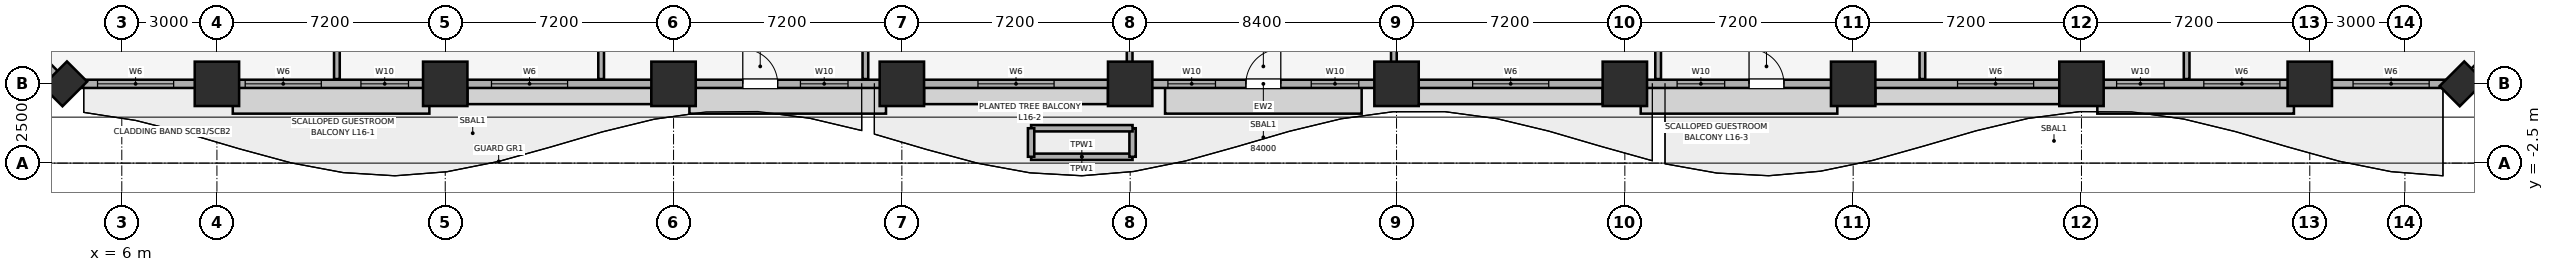
"""IFC4 building model, lengths in metres.
Left out: names, types, materials, properties, quantities, classifications, styles, units other than length and angle.
Written with IfcOpenShell. Run it as: python <this file> out.ifc"""

import sys

from ifc_helpers import new_model, si_unit, direction, frame, frame_2d, origin, origin_2d, place, context, subcontext, project, spatial, rectangle, extrude, element, fill, save


model = new_model("IFC4")
c1 = context("Model", 3, precision=1e-05, world=origin(), true_north=direction((0.0, 1.0)))
c2 = subcontext(c1, "Body", "Model", "MODEL_VIEW")
j1 = project(units=[si_unit("LENGTHUNIT", "METRE"), si_unit("PLANEANGLEUNIT", "RADIAN")], contexts=[c1])
p1 = place(None, origin())
s1 = spatial("IfcSite", under=j1, at=p1, CompositionType="ELEMENT")
p2 = place(p1, origin())
s2 = spatial("IfcBuilding", under=s1, at=p2, CompositionType="ELEMENT")
p3 = place(p2, frame((0.0, 0.0, 72.65)))
s3 = spatial("IfcBuildingStorey", under=s2, at=p3, CompositionType="ELEMENT", Elevation=72.65)
for number, where, z_axis, x_axis in (
    (1, (9.0, 0.0, 0.0), (0.0, 0.0, 1.0), (1.0, 0.0, 0.0)),
    (2, (16.2, 0.0, 0.0), (0.0, 0.0, 1.0), (1.0, 0.0, 0.0)),
    (3, (23.4, 0.0, 0.0), (0.0, 0.0, 1.0), (1.0, 0.0, 0.0)),
    (4, (30.6, 0.0, 0.0), (0.0, 0.0, 1.0), (1.0, 0.0, 0.0)),
    (5, (37.8, 0.0, 0.0), (0.0, 0.0, 1.0), (1.0, 0.0, 0.0)),
    (6, (46.2, 0.0, 0.0), (0.0, 0.0, 1.0), (1.0, 0.0, 0.0)),
    (7, (53.4, 0.0, 0.0), (0.0, 0.0, 1.0), (1.0, 0.0, 0.0)),
    (8, (60.6, 0.0, 0.0), (0.0, 0.0, 1.0), (1.0, 0.0, 0.0)),
    (9, (67.8, 0.0, 0.0), (0.0, 0.0, 1.0), (1.0, 0.0, 0.0)),
    (10, (75.0, 0.0, 0.0), (0.0, 0.0, 1.0), (1.0, 0.0, 0.0)),
):
    element("IfcColumn", number, at=place(p3, frame(where, z_axis=z_axis, x_axis=x_axis)), inside=s3, PredefinedType="COLUMN", context=c2, shape_type="SweptSolid", body=[
        extrude(rectangle(XDim=1.4, YDim=1.4, at=origin_2d()), origin(), (0.0, 0.0, 1.0), 3.51),
    ])
for number, where, z_axis, x_axis in (
    (11, (4.2, 0.0, 0.0), (0.0, 0.0, 1.0), (0.707, 0.707, 0.0)),
    (12, (79.8, 0.0, 0.0), (0.0, 0.0, 1.0), (0.707, 0.707, 0.0)),
):
    element("IfcColumn", number, at=place(p3, frame(where, z_axis=z_axis, x_axis=x_axis)), inside=s3, PredefinedType="PILASTER", context=c2, shape_type="SweptSolid", body=[
        extrude(rectangle(XDim=1.1, YDim=0.9, at=origin_2d()), origin(), (0.0, 0.0, 1.0), 3.51),
    ])
p4 = place(p3, frame((4.2, 0.0, 0.0), z_axis=(0.0, 0.0, 1.0), x_axis=(1.0, 0.0, 0.0)))
e13 = element("IfcWall", 13, at=p4, inside=s3, PredefinedType="SOLIDWALL", context=c2, shape_type="SweptSolid", body=[
    extrude(rectangle(XDim=75.6, YDim=0.26, at=frame_2d((37.8, 0.0))), origin(), (0.0, 0.0, 1.0), 2.56),
])
p5 = place(p4, frame((21.383, 0.0, 0.0)))
e14 = element("IfcOpeningElement", 14, at=p5, cuts=e13, PredefinedType="OPENING", context=c2, shape_type="SweptSolid", body=[
    extrude(rectangle(XDim=1.1, YDim=2.15, at=frame_2d((0.55, 1.075))), frame((0.0, 0.14, 0.0), z_axis=(0.0, -1.0, 0.0), x_axis=(1.0, 0.0, 0.0)), (0.0, 0.0, 1.0), 0.28),
])
p6 = place(p4, frame((37.25, 0.0, 0.0)))
e15 = element("IfcOpeningElement", 15, at=p6, cuts=e13, PredefinedType="OPENING", context=c2, shape_type="SweptSolid", body=[
    extrude(rectangle(XDim=1.1, YDim=2.15, at=frame_2d((0.55, 1.075))), frame((0.0, 0.14, 0.0), z_axis=(0.0, -1.0, 0.0), x_axis=(1.0, 0.0, 0.0)), (0.0, 0.0, 1.0), 0.28),
])
p7 = place(p4, frame((53.117, 0.0, 0.0)))
e16 = element("IfcOpeningElement", 16, at=p7, cuts=e13, PredefinedType="OPENING", context=c2, shape_type="SweptSolid", body=[
    extrude(rectangle(XDim=1.1, YDim=2.15, at=frame_2d((0.55, 1.075))), frame((0.0, 0.14, 0.0), z_axis=(0.0, -1.0, 0.0), x_axis=(1.0, 0.0, 0.0)), (0.0, 0.0, 1.0), 0.28),
])
p8 = place(p4, frame((1.035, 0.0, 0.85)))
e17 = element("IfcOpeningElement", 17, at=p8, cuts=e13, PredefinedType="OPENING", context=c2, shape_type="SweptSolid", body=[
    extrude(rectangle(XDim=2.4, YDim=1.5, at=frame_2d((1.2, 0.75))), frame((0.0, 0.14, 0.0), z_axis=(0.0, -1.0, 0.0), x_axis=(1.0, 0.0, 0.0)), (0.0, 0.0, 1.0), 0.28),
])
p9 = place(p4, frame((5.691, 0.0, 0.85)))
e18 = element("IfcOpeningElement", 18, at=p9, cuts=e13, PredefinedType="OPENING", context=c2, shape_type="SweptSolid", body=[
    extrude(rectangle(XDim=2.4, YDim=1.5, at=frame_2d((1.2, 0.75))), frame((0.0, 0.14, 0.0), z_axis=(0.0, -1.0, 0.0), x_axis=(1.0, 0.0, 0.0)), (0.0, 0.0, 1.0), 0.28),
])
p10 = place(p4, frame((9.342, 0.0, 0.85)))
e19 = element("IfcOpeningElement", 19, at=p10, cuts=e13, PredefinedType="OPENING", context=c2, shape_type="SweptSolid", body=[
    extrude(rectangle(XDim=1.5, YDim=1.4, at=frame_2d((0.75, 0.7))), frame((0.0, 0.14, 0.0), z_axis=(0.0, -1.0, 0.0), x_axis=(1.0, 0.0, 0.0)), (0.0, 0.0, 1.0), 0.28),
])
p11 = place(p4, frame((13.458, 0.0, 0.85)))
e20 = element("IfcOpeningElement", 20, at=p11, cuts=e13, PredefinedType="OPENING", context=c2, shape_type="SweptSolid", body=[
    extrude(rectangle(XDim=2.4, YDim=1.5, at=frame_2d((1.2, 0.75))), frame((0.0, 0.14, 0.0), z_axis=(0.0, -1.0, 0.0), x_axis=(1.0, 0.0, 0.0)), (0.0, 0.0, 1.0), 0.28),
])
p12 = place(p4, frame((23.202, 0.0, 0.85)))
e21 = element("IfcOpeningElement", 21, at=p12, cuts=e13, PredefinedType="OPENING", context=c2, shape_type="SweptSolid", body=[
    extrude(rectangle(XDim=1.5, YDim=1.4, at=frame_2d((0.75, 0.7))), frame((0.0, 0.14, 0.0), z_axis=(0.0, -1.0, 0.0), x_axis=(1.0, 0.0, 0.0)), (0.0, 0.0, 1.0), 0.28),
])
p13 = place(p4, frame((28.8, 0.0, 0.85)))
e22 = element("IfcOpeningElement", 22, at=p13, cuts=e13, PredefinedType="OPENING", context=c2, shape_type="SweptSolid", body=[
    extrude(rectangle(XDim=2.4, YDim=1.5, at=frame_2d((1.2, 0.75))), frame((0.0, 0.14, 0.0), z_axis=(0.0, -1.0, 0.0), x_axis=(1.0, 0.0, 0.0)), (0.0, 0.0, 1.0), 0.28),
])
p14 = place(p4, frame((34.79, 0.0, 0.85)))
e23 = element("IfcOpeningElement", 23, at=p14, cuts=e13, PredefinedType="OPENING", context=c2, shape_type="SweptSolid", body=[
    extrude(rectangle(XDim=1.5, YDim=1.4, at=frame_2d((0.75, 0.7))), frame((0.0, 0.14, 0.0), z_axis=(0.0, -1.0, 0.0), x_axis=(1.0, 0.0, 0.0)), (0.0, 0.0, 1.0), 0.28),
])
p15 = place(p4, frame((39.31, 0.0, 0.85)))
e24 = element("IfcOpeningElement", 24, at=p15, cuts=e13, PredefinedType="OPENING", context=c2, shape_type="SweptSolid", body=[
    extrude(rectangle(XDim=1.5, YDim=1.4, at=frame_2d((0.75, 0.7))), frame((0.0, 0.14, 0.0), z_axis=(0.0, -1.0, 0.0), x_axis=(1.0, 0.0, 0.0)), (0.0, 0.0, 1.0), 0.28),
])
p16 = place(p4, frame((44.4, 0.0, 0.85)))
e25 = element("IfcOpeningElement", 25, at=p16, cuts=e13, PredefinedType="OPENING", context=c2, shape_type="SweptSolid", body=[
    extrude(rectangle(XDim=2.4, YDim=1.5, at=frame_2d((1.2, 0.75))), frame((0.0, 0.14, 0.0), z_axis=(0.0, -1.0, 0.0), x_axis=(1.0, 0.0, 0.0)), (0.0, 0.0, 1.0), 0.28),
])
p17 = place(p4, frame((50.848, 0.0, 0.85)))
e26 = element("IfcOpeningElement", 26, at=p17, cuts=e13, PredefinedType="OPENING", context=c2, shape_type="SweptSolid", body=[
    extrude(rectangle(XDim=1.5, YDim=1.4, at=frame_2d((0.75, 0.7))), frame((0.0, 0.14, 0.0), z_axis=(0.0, -1.0, 0.0), x_axis=(1.0, 0.0, 0.0)), (0.0, 0.0, 1.0), 0.28),
])
p18 = place(p4, frame((59.691, 0.0, 0.85)))
e27 = element("IfcOpeningElement", 27, at=p18, cuts=e13, PredefinedType="OPENING", context=c2, shape_type="SweptSolid", body=[
    extrude(rectangle(XDim=2.4, YDim=1.5, at=frame_2d((1.2, 0.75))), frame((0.0, 0.14, 0.0), z_axis=(0.0, -1.0, 0.0), x_axis=(1.0, 0.0, 0.0)), (0.0, 0.0, 1.0), 0.28),
])
p19 = place(p4, frame((64.708, 0.0, 0.85)))
e28 = element("IfcOpeningElement", 28, at=p19, cuts=e13, PredefinedType="OPENING", context=c2, shape_type="SweptSolid", body=[
    extrude(rectangle(XDim=1.5, YDim=1.4, at=frame_2d((0.75, 0.7))), frame((0.0, 0.14, 0.0), z_axis=(0.0, -1.0, 0.0), x_axis=(1.0, 0.0, 0.0)), (0.0, 0.0, 1.0), 0.28),
])
p20 = place(p4, frame((67.458, 0.0, 0.85)))
e29 = element("IfcOpeningElement", 29, at=p20, cuts=e13, PredefinedType="OPENING", context=c2, shape_type="SweptSolid", body=[
    extrude(rectangle(XDim=2.4, YDim=1.5, at=frame_2d((1.2, 0.75))), frame((0.0, 0.14, 0.0), z_axis=(0.0, -1.0, 0.0), x_axis=(1.0, 0.0, 0.0)), (0.0, 0.0, 1.0), 0.28),
])
p21 = place(p4, frame((72.165, 0.0, 0.85)))
e30 = element("IfcOpeningElement", 30, at=p21, cuts=e13, PredefinedType="OPENING", context=c2, shape_type="SweptSolid", body=[
    extrude(rectangle(XDim=2.4, YDim=1.5, at=frame_2d((1.2, 0.75))), frame((0.0, 0.14, 0.0), z_axis=(0.0, -1.0, 0.0), x_axis=(1.0, 0.0, 0.0)), (0.0, 0.0, 1.0), 0.28),
])
for number, where, z_axis, x_axis in (
    (31, (79.8, 0.0, 0.0), (0.0, 0.0, 1.0), (0.707, 0.707, 0.0)),
    (32, (0.0, 4.2, 0.0), (0.0, 0.0, 1.0), (0.707, -0.707, 0.0)),
):
    element("IfcWall", number, at=place(p3, frame(where, z_axis=z_axis, x_axis=x_axis)), inside=s3, PredefinedType="SOLIDWALL", context=c2, shape_type="SweptSolid", body=[
        extrude(rectangle(XDim=5.94, YDim=0.26, at=frame_2d((2.97, 0.0))), origin(), (0.0, 0.0, 1.0), 2.56),
    ])
p22 = place(p3, frame((34.676, -2.3, 0.0), z_axis=(0.0, 0.0, 1.0), x_axis=(1.0, 0.0, 0.0)))
e33 = element("IfcWall", 33, at=p22, inside=s3, PredefinedType="PARAPET", context=c2, shape_type="SweptSolid", body=[
    extrude(rectangle(XDim=3.2, YDim=0.2, at=frame_2d((1.6, 0.0))), origin(), (0.0, 0.0, 1.0), 0.55),
])
p23 = place(p3, frame((37.875, -2.3, 0.0), z_axis=(0.0, 0.0, 1.0), x_axis=(0.0, 1.0, 0.0)))
e34 = element("IfcWall", 34, at=p23, inside=s3, PredefinedType="PARAPET", context=c2, shape_type="SweptSolid", body=[
    extrude(rectangle(XDim=0.9, YDim=0.2, at=frame_2d((0.45, 0.0))), origin(), (0.0, 0.0, 1.0), 0.55),
])
p24 = place(p3, frame((37.875, -1.4, 0.0), z_axis=(0.0, 0.0, 1.0), x_axis=(-1.0, 0.0, 0.0)))
e35 = element("IfcWall", 35, at=p24, inside=s3, PredefinedType="PARAPET", context=c2, shape_type="SweptSolid", body=[
    extrude(rectangle(XDim=3.2, YDim=0.2, at=frame_2d((1.6, 0.0))), origin(), (0.0, 0.0, 1.0), 0.55),
])
p25 = place(p3, frame((34.676, -1.4, 0.0), z_axis=(0.0, 0.0, 1.0), x_axis=(0.0, -1.0, 0.0)))
e36 = element("IfcWall", 36, at=p25, inside=s3, PredefinedType="PARAPET", context=c2, shape_type="SweptSolid", body=[
    extrude(rectangle(XDim=0.9, YDim=0.2, at=frame_2d((0.45, 0.0))), origin(), (0.0, 0.0, 1.0), 0.55),
])
p26 = place(p3, frame((12.783, 0.15, 0.0), z_axis=(0.0, 0.0, 1.0), x_axis=(0.0, 1.0, 0.0)))
e37 = element("IfcWall", 37, at=p26, inside=s3, PredefinedType="PARTITIONING", context=c2, shape_type="SweptSolid", body=[
    extrude(rectangle(XDim=18.955, YDim=0.18, at=frame_2d((9.478, 0.0))), origin(), (0.0, 0.0, 1.0), 2.898),
])
for number, where, z_axis, x_axis in (
    (38, (21.117, 0.15, 0.0), (0.0, 0.0, 1.0), (0.0, 1.0, 0.0)),
    (39, (29.45, 0.15, 0.0), (0.0, 0.0, 1.0), (0.0, 1.0, 0.0)),
):
    element("IfcWall", number, at=place(p3, frame(where, z_axis=z_axis, x_axis=x_axis)), inside=s3, PredefinedType="PARTITIONING", context=c2, shape_type="SweptSolid", body=[
        extrude(rectangle(XDim=18.955, YDim=0.18, at=frame_2d((9.478, 0.0))), origin(), (0.0, 0.0, 1.0), 3.51),
    ])
for number, where, z_axis, x_axis in (
    (40, (37.783, 0.15, 0.0), (0.0, 0.0, 1.0), (0.0, 1.0, 0.0)),
    (41, (46.116, 0.15, 0.0), (0.0, 0.0, 1.0), (0.0, 1.0, 0.0)),
):
    element("IfcWall", number, at=place(p3, frame(where, z_axis=z_axis, x_axis=x_axis)), inside=s3, PredefinedType="PARTITIONING", context=c2, shape_type="SweptSolid", body=[
        extrude(rectangle(XDim=18.955, YDim=0.18, at=frame_2d((9.478, 0.0))), origin(), (0.0, 0.0, 1.0), 2.898),
    ])
for number, where, z_axis, x_axis in (
    (42, (54.45, 0.15, 0.0), (0.0, 0.0, 1.0), (0.0, 1.0, 0.0)),
    (43, (62.783, 0.15, 0.0), (0.0, 0.0, 1.0), (0.0, 1.0, 0.0)),
):
    element("IfcWall", number, at=place(p3, frame(where, z_axis=z_axis, x_axis=x_axis)), inside=s3, PredefinedType="PARTITIONING", context=c2, shape_type="SweptSolid", body=[
        extrude(rectangle(XDim=18.955, YDim=0.18, at=frame_2d((9.478, 0.0))), origin(), (0.0, 0.0, 1.0), 3.51),
    ])
p27 = place(p3, frame((71.116, 0.15, 0.0), z_axis=(0.0, 0.0, 1.0), x_axis=(0.0, 1.0, 0.0)))
e44 = element("IfcWall", 44, at=p27, inside=s3, PredefinedType="PARTITIONING", context=c2, shape_type="SweptSolid", body=[
    extrude(rectangle(XDim=18.955, YDim=0.18, at=frame_2d((9.478, 0.0))), origin(), (0.0, 0.0, 1.0), 2.898),
])
p28 = place(p5, origin())
e45 = element("IfcDoor", 45, at=p28, inside=s3, OperationType="SINGLE_SWING_LEFT", PredefinedType="DOOR", context=c2, shape_type="SweptSolid", body=[
    extrude(rectangle(XDim=1.1, YDim=2.15, at=frame_2d((0.55, 1.075))), frame((0.0, 0.025, 0.0), z_axis=(0.0, -1.0, 0.0), x_axis=(1.0, 0.0, 0.0)), (0.0, 0.0, 1.0), 0.05),
])
fill(e14, e45)
p29 = place(p6, origin())
e46 = element("IfcDoor", 46, at=p29, inside=s3, OperationType="SINGLE_SWING_RIGHT", PredefinedType="DOOR", context=c2, shape_type="SweptSolid", body=[
    extrude(rectangle(XDim=1.1, YDim=2.15, at=frame_2d((0.55, 1.075))), frame((0.0, 0.025, 0.0), z_axis=(0.0, -1.0, 0.0), x_axis=(1.0, 0.0, 0.0)), (0.0, 0.0, 1.0), 0.05),
])
fill(e15, e46)
p30 = place(p7, origin())
e47 = element("IfcDoor", 47, at=p30, inside=s3, OperationType="SINGLE_SWING_LEFT", PredefinedType="DOOR", context=c2, shape_type="SweptSolid", body=[
    extrude(rectangle(XDim=1.1, YDim=2.15, at=frame_2d((0.55, 1.075))), frame((0.0, 0.025, 0.0), z_axis=(0.0, -1.0, 0.0), x_axis=(1.0, 0.0, 0.0)), (0.0, 0.0, 1.0), 0.05),
])
fill(e16, e47)
p31 = place(p8, origin())
e48 = element("IfcWindow", 48, at=p31, inside=s3, PartitioningType="SINGLE_PANEL", PredefinedType="WINDOW", context=c2, shape_type="SweptSolid", body=[
    extrude(rectangle(XDim=2.4, YDim=1.5, at=frame_2d((1.2, 0.75))), frame((0.0, 0.03, 0.0), z_axis=(0.0, -1.0, 0.0), x_axis=(1.0, 0.0, 0.0)), (0.0, 0.0, 1.0), 0.06),
])
fill(e17, e48)
p32 = place(p9, origin())
e49 = element("IfcWindow", 49, at=p32, inside=s3, PartitioningType="SINGLE_PANEL", PredefinedType="WINDOW", context=c2, shape_type="SweptSolid", body=[
    extrude(rectangle(XDim=2.4, YDim=1.5, at=frame_2d((1.2, 0.75))), frame((0.0, 0.03, 0.0), z_axis=(0.0, -1.0, 0.0), x_axis=(1.0, 0.0, 0.0)), (0.0, 0.0, 1.0), 0.06),
])
fill(e18, e49)
p33 = place(p10, origin())
e50 = element("IfcWindow", 50, at=p33, inside=s3, PartitioningType="SINGLE_PANEL", PredefinedType="WINDOW", context=c2, shape_type="SweptSolid", body=[
    extrude(rectangle(XDim=1.5, YDim=1.4, at=frame_2d((0.75, 0.7))), frame((0.0, 0.03, 0.0), z_axis=(0.0, -1.0, 0.0), x_axis=(1.0, 0.0, 0.0)), (0.0, 0.0, 1.0), 0.06),
])
fill(e19, e50)
p34 = place(p11, origin())
e51 = element("IfcWindow", 51, at=p34, inside=s3, PartitioningType="SINGLE_PANEL", PredefinedType="WINDOW", context=c2, shape_type="SweptSolid", body=[
    extrude(rectangle(XDim=2.4, YDim=1.5, at=frame_2d((1.2, 0.75))), frame((0.0, 0.03, 0.0), z_axis=(0.0, -1.0, 0.0), x_axis=(1.0, 0.0, 0.0)), (0.0, 0.0, 1.0), 0.06),
])
fill(e20, e51)
p35 = place(p12, origin())
e52 = element("IfcWindow", 52, at=p35, inside=s3, PartitioningType="SINGLE_PANEL", PredefinedType="WINDOW", context=c2, shape_type="SweptSolid", body=[
    extrude(rectangle(XDim=1.5, YDim=1.4, at=frame_2d((0.75, 0.7))), frame((0.0, 0.03, 0.0), z_axis=(0.0, -1.0, 0.0), x_axis=(1.0, 0.0, 0.0)), (0.0, 0.0, 1.0), 0.06),
])
fill(e21, e52)
p36 = place(p13, origin())
e53 = element("IfcWindow", 53, at=p36, inside=s3, PartitioningType="SINGLE_PANEL", PredefinedType="WINDOW", context=c2, shape_type="SweptSolid", body=[
    extrude(rectangle(XDim=2.4, YDim=1.5, at=frame_2d((1.2, 0.75))), frame((0.0, 0.03, 0.0), z_axis=(0.0, -1.0, 0.0), x_axis=(1.0, 0.0, 0.0)), (0.0, 0.0, 1.0), 0.06),
])
fill(e22, e53)
p37 = place(p14, origin())
e54 = element("IfcWindow", 54, at=p37, inside=s3, PartitioningType="SINGLE_PANEL", PredefinedType="WINDOW", context=c2, shape_type="SweptSolid", body=[
    extrude(rectangle(XDim=1.5, YDim=1.4, at=frame_2d((0.75, 0.7))), frame((0.0, 0.03, 0.0), z_axis=(0.0, -1.0, 0.0), x_axis=(1.0, 0.0, 0.0)), (0.0, 0.0, 1.0), 0.06),
])
fill(e23, e54)
p38 = place(p15, origin())
e55 = element("IfcWindow", 55, at=p38, inside=s3, PartitioningType="SINGLE_PANEL", PredefinedType="WINDOW", context=c2, shape_type="SweptSolid", body=[
    extrude(rectangle(XDim=1.5, YDim=1.4, at=frame_2d((0.75, 0.7))), frame((0.0, 0.03, 0.0), z_axis=(0.0, -1.0, 0.0), x_axis=(1.0, 0.0, 0.0)), (0.0, 0.0, 1.0), 0.06),
])
fill(e24, e55)
p39 = place(p16, origin())
e56 = element("IfcWindow", 56, at=p39, inside=s3, PartitioningType="SINGLE_PANEL", PredefinedType="WINDOW", context=c2, shape_type="SweptSolid", body=[
    extrude(rectangle(XDim=2.4, YDim=1.5, at=frame_2d((1.2, 0.75))), frame((0.0, 0.03, 0.0), z_axis=(0.0, -1.0, 0.0), x_axis=(1.0, 0.0, 0.0)), (0.0, 0.0, 1.0), 0.06),
])
fill(e25, e56)
p40 = place(p17, origin())
e57 = element("IfcWindow", 57, at=p40, inside=s3, PartitioningType="SINGLE_PANEL", PredefinedType="WINDOW", context=c2, shape_type="SweptSolid", body=[
    extrude(rectangle(XDim=1.5, YDim=1.4, at=frame_2d((0.75, 0.7))), frame((0.0, 0.03, 0.0), z_axis=(0.0, -1.0, 0.0), x_axis=(1.0, 0.0, 0.0)), (0.0, 0.0, 1.0), 0.06),
])
fill(e26, e57)
p41 = place(p18, origin())
e58 = element("IfcWindow", 58, at=p41, inside=s3, PartitioningType="SINGLE_PANEL", PredefinedType="WINDOW", context=c2, shape_type="SweptSolid", body=[
    extrude(rectangle(XDim=2.4, YDim=1.5, at=frame_2d((1.2, 0.75))), frame((0.0, 0.03, 0.0), z_axis=(0.0, -1.0, 0.0), x_axis=(1.0, 0.0, 0.0)), (0.0, 0.0, 1.0), 0.06),
])
fill(e27, e58)
p42 = place(p19, origin())
e59 = element("IfcWindow", 59, at=p42, inside=s3, PartitioningType="SINGLE_PANEL", PredefinedType="WINDOW", context=c2, shape_type="SweptSolid", body=[
    extrude(rectangle(XDim=1.5, YDim=1.4, at=frame_2d((0.75, 0.7))), frame((0.0, 0.03, 0.0), z_axis=(0.0, -1.0, 0.0), x_axis=(1.0, 0.0, 0.0)), (0.0, 0.0, 1.0), 0.06),
])
fill(e28, e59)
p43 = place(p20, origin())
e60 = element("IfcWindow", 60, at=p43, inside=s3, PartitioningType="SINGLE_PANEL", PredefinedType="WINDOW", context=c2, shape_type="SweptSolid", body=[
    extrude(rectangle(XDim=2.4, YDim=1.5, at=frame_2d((1.2, 0.75))), frame((0.0, 0.03, 0.0), z_axis=(0.0, -1.0, 0.0), x_axis=(1.0, 0.0, 0.0)), (0.0, 0.0, 1.0), 0.06),
])
fill(e29, e60)
p44 = place(p21, origin())
e61 = element("IfcWindow", 61, at=p44, inside=s3, PartitioningType="SINGLE_PANEL", PredefinedType="WINDOW", context=c2, shape_type="SweptSolid", body=[
    extrude(rectangle(XDim=2.4, YDim=1.5, at=frame_2d((1.2, 0.75))), frame((0.0, 0.03, 0.0), z_axis=(0.0, -1.0, 0.0), x_axis=(1.0, 0.0, 0.0)), (0.0, 0.0, 1.0), 0.06),
])
fill(e30, e61)
save(model, sys.argv[1])
